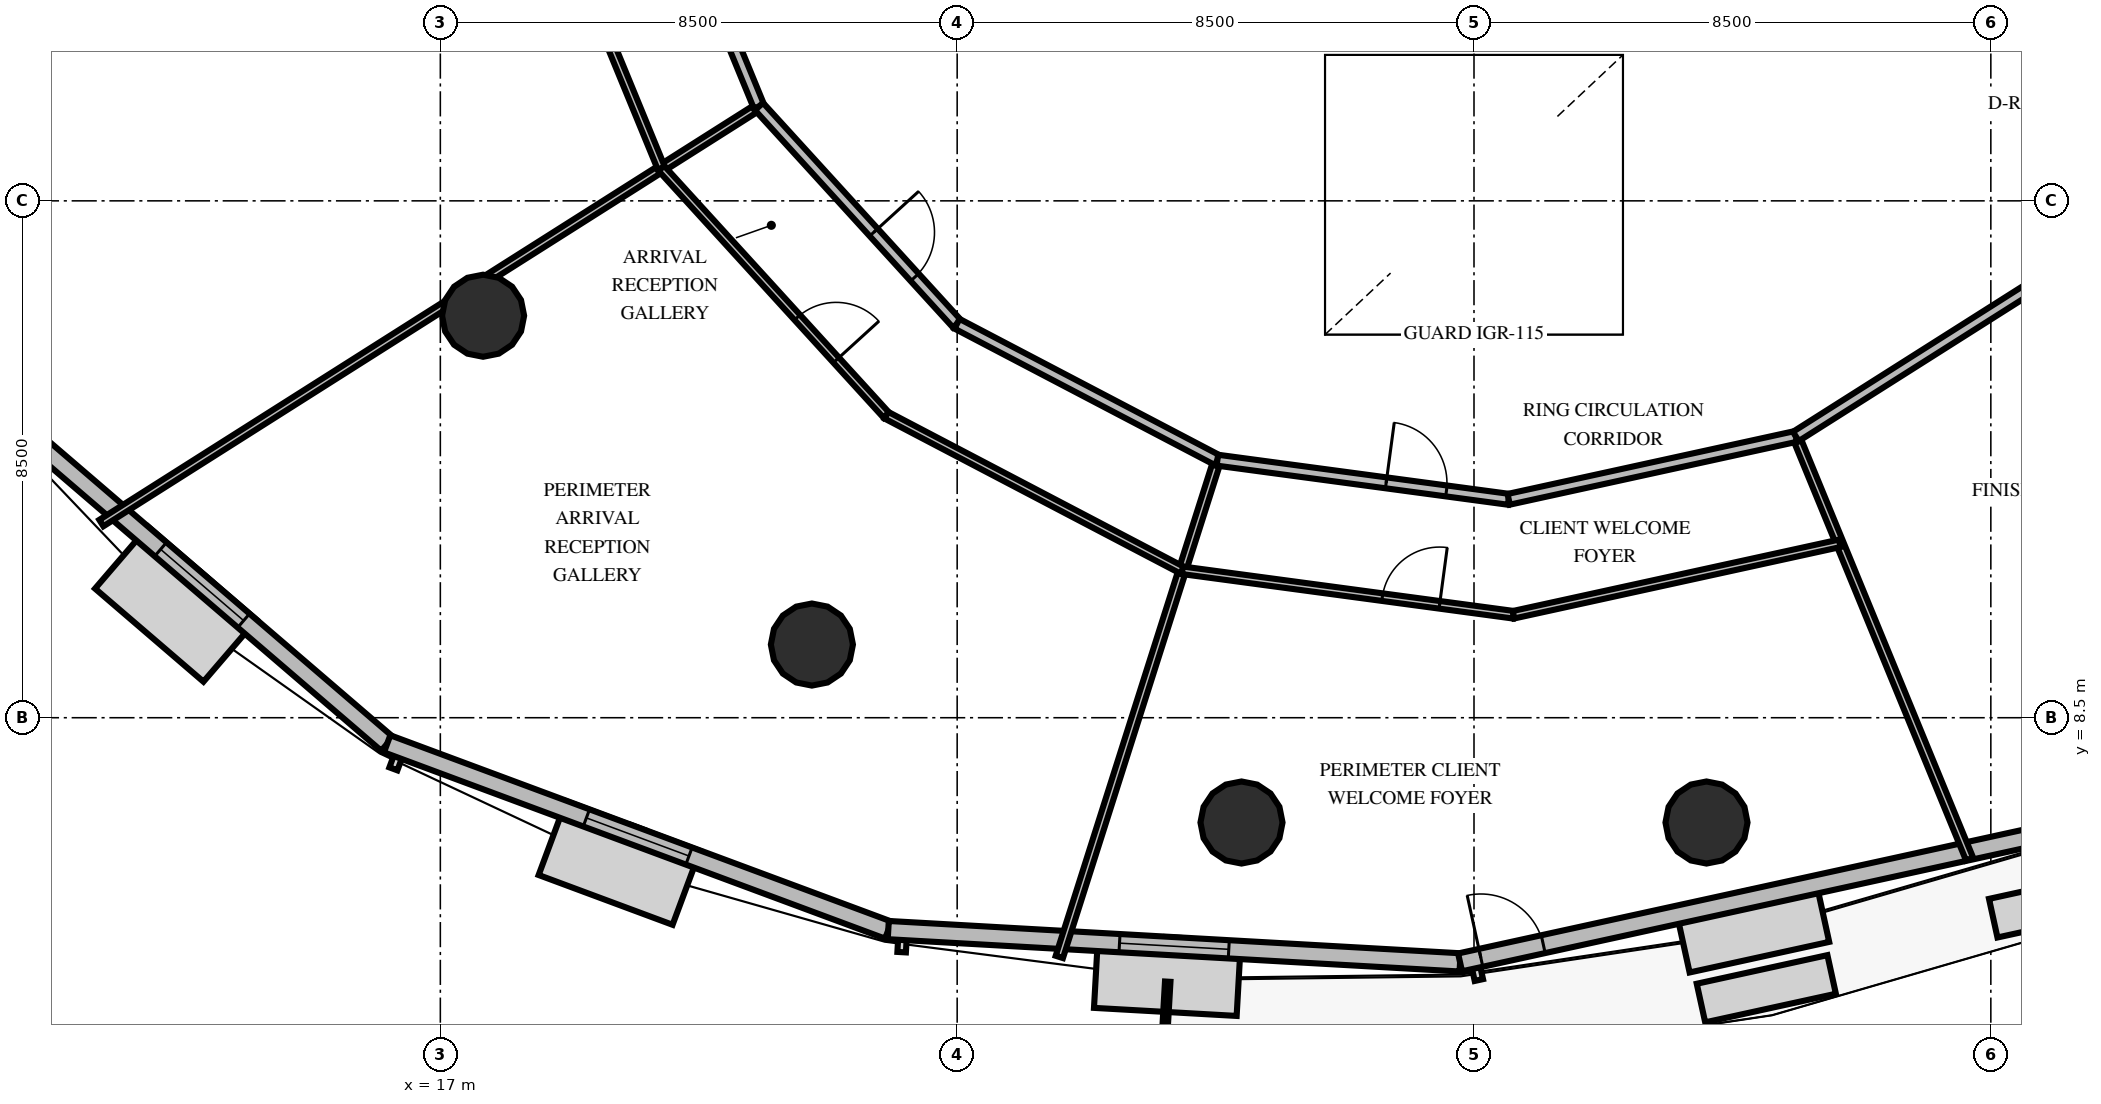
"""IFC4 building model, lengths in metres.
Left out: names, types, materials, properties, quantities, classifications, styles, units other than length and angle.
Written with IfcOpenShell. Run it as: python <this file> out.ifc"""

import sys

from ifc_helpers import new_model, si_unit, direction, frame, frame_2d, origin, origin_2d, place, context, subcontext, project, spatial, rectangle, circle, extrude, element, fill, save


model = new_model("IFC4")
c1 = context("Model", 3, precision=1e-05, world=origin(), true_north=direction((0.0, 1.0)))
c2 = subcontext(c1, "Body", "Model", "MODEL_VIEW")
j1 = project(units=[si_unit("LENGTHUNIT", "METRE"), si_unit("PLANEANGLEUNIT", "RADIAN")], contexts=[c1])
p1 = place(None, origin())
s1 = spatial("IfcSite", under=j1, at=p1, CompositionType="ELEMENT")
p2 = place(p1, origin())
s2 = spatial("IfcBuilding", under=s1, at=p2, CompositionType="ELEMENT")
p3 = place(p2, frame((0.0, 0.0, 84.6)))
s3 = spatial("IfcBuildingStorey", under=s2, at=p3, CompositionType="ELEMENT", Elevation=84.6)
for number, where, z_axis, x_axis in (
    (1, (17.703, 15.111, 0.0), (0.0, 0.0, 1.0), (1.0, 0.0, 0.0)),
    (2, (23.111, 9.703, 0.0), (0.0, 0.0, 1.0), (1.0, 0.0, 0.0)),
    (3, (30.176, 6.777, 0.0), (0.0, 0.0, 1.0), (1.0, 0.0, 0.0)),
    (4, (37.824, 6.777, 0.0), (0.0, 0.0, 1.0), (1.0, 0.0, 0.0)),
):
    element("IfcColumn", number, at=place(p3, frame(where, z_axis=z_axis, x_axis=x_axis)), inside=s3, PredefinedType="COLUMN", context=c2, shape_type="SweptSolid", body=[
        extrude(circle(Radius=0.675, at=origin_2d()), origin(), (0.0, 0.0, 1.0), 4.2),
    ])
p4 = place(p3, frame((10.039, 13.296, 0.0), z_axis=(0.0, 0.0, 1.0), x_axis=(0.758684823953, -0.651457855815, 0.0)))
e5 = element("IfcWall", 5, at=p4, inside=s3, PredefinedType="SOLIDWALL", context=c2, shape_type="SweptSolid", body=[
    extrude(rectangle(XDim=8.021, YDim=0.3, at=frame_2d((4.011, 0.0))), origin(), (0.0, 0.0, 1.0), 2.96),
])
p5 = place(p4, frame((3.111, 0.0, 0.8)))
e6 = element("IfcOpeningElement", 6, at=p5, cuts=e5, PredefinedType="OPENING", context=c2, shape_type="SweptSolid", body=[
    extrude(rectangle(XDim=1.8, YDim=1.95, at=frame_2d((0.9, 0.975))), frame((0.0, 0.16, 0.0), z_axis=(0.0, -1.0, 0.0), x_axis=(1.0, 0.0, 0.0)), (0.0, 0.0, 1.0), 0.32),
])
p6 = place(p3, frame((16.125, 8.071, 0.0), z_axis=(0.0, 0.0, 1.0), x_axis=(0.937362334375, -0.348355930184, 0.0)))
e7 = element("IfcWall", 7, at=p6, inside=s3, PredefinedType="SOLIDWALL", context=c2, shape_type="SweptSolid", body=[
    extrude(rectangle(XDim=8.793, YDim=0.3, at=frame_2d((4.396, 0.0))), origin(), (0.0, 0.0, 1.0), 2.96),
])
p7 = place(p6, frame((3.496, 0.0, 0.8)))
e8 = element("IfcOpeningElement", 8, at=p7, cuts=e7, PredefinedType="OPENING", context=c2, shape_type="SweptSolid", body=[
    extrude(rectangle(XDim=1.8, YDim=1.95, at=frame_2d((0.9, 0.975))), frame((0.0, 0.16, 0.0), z_axis=(0.0, -1.0, 0.0), x_axis=(1.0, 0.0, 0.0)), (0.0, 0.0, 1.0), 0.32),
])
p8 = place(p3, frame((24.367, 5.008, 0.0), z_axis=(0.0, 0.0, 1.0), x_axis=(0.998409535383, -0.056377297353, 0.0)))
e9 = element("IfcWall", 9, at=p8, inside=s3, PredefinedType="SOLIDWALL", context=c2, shape_type="SweptSolid", body=[
    extrude(rectangle(XDim=9.419, YDim=0.3, at=frame_2d((4.709, 0.0))), origin(), (0.0, 0.0, 1.0), 2.96),
])
p9 = place(p8, frame((3.809, 0.0, 0.8)))
e10 = element("IfcOpeningElement", 10, at=p9, cuts=e9, PredefinedType="OPENING", context=c2, shape_type="SweptSolid", body=[
    extrude(rectangle(XDim=1.8, YDim=1.95, at=frame_2d((0.9, 0.975))), frame((0.0, 0.16, 0.0), z_axis=(0.0, -1.0, 0.0), x_axis=(1.0, 0.0, 0.0)), (0.0, 0.0, 1.0), 0.32),
])
p10 = place(p3, frame((33.771, 4.477, 0.0), z_axis=(0.0, 0.0, 1.0), x_axis=(0.97686057385, 0.213877112516, 0.0)))
e11 = element("IfcWall", 11, at=p10, inside=s3, PredefinedType="SOLIDWALL", context=c2, shape_type="SweptSolid", body=[
    extrude(rectangle(XDim=9.655, YDim=0.3, at=frame_2d((4.827, 0.0))), origin(), (0.0, 0.0, 1.0), 2.96),
])
p11 = place(p10, frame((0.35, 0.0, 0.0)))
e12 = element("IfcOpeningElement", 12, at=p11, cuts=e11, PredefinedType="OPENING", context=c2, shape_type="SweptSolid", body=[
    extrude(rectangle(XDim=1.05, YDim=2.15, at=frame_2d((0.525, 1.075))), frame((0.0, 0.16, 0.0), z_axis=(0.0, -1.0, 0.0), x_axis=(1.0, 0.0, 0.0)), (0.0, 0.0, 1.0), 0.32),
])
p12 = place(p3, frame((22.24, 18.552, 0.0), z_axis=(0.0, 0.0, 1.0), x_axis=(-0.844793501384, -0.535092459318, 0.0)))
e13 = element("IfcWall", 13, at=p12, inside=s3, PredefinedType="PARTITIONING", context=c2, shape_type="SweptSolid", body=[
    extrude(rectangle(XDim=12.802, YDim=0.125, at=frame_2d((6.401, 0.0))), origin(), (0.0, 0.0, 1.0), 2.96),
])
p13 = place(p3, frame((20.402, 23.023, 0.0), z_axis=(0.0, 0.0, 1.0), x_axis=(0.380272236521, -0.924874600219, 0.0)))
e14 = element("IfcWall", 14, at=p13, inside=s3, PredefinedType="PARTITIONING", context=c2, shape_type="SweptSolid", body=[
    extrude(rectangle(XDim=4.834, YDim=0.18, at=frame_2d((2.417, 0.0))), origin(), (0.0, 0.0, 1.0), 2.96),
])
p14 = place(p13, frame((1.917, 0.0, 0.0)))
e15 = element("IfcOpeningElement", 15, at=p14, cuts=e14, PredefinedType="OPENING", context=c2, shape_type="SweptSolid", body=[
    extrude(rectangle(XDim=1.0, YDim=2.15, at=frame_2d((0.5, 1.075))), frame((0.0, 0.1, 0.0), z_axis=(0.0, -1.0, 0.0), x_axis=(1.0, 0.0, 0.0)), (0.0, 0.0, 1.0), 0.2),
])
p15 = place(p3, frame((18.546, 22.616, 0.0), z_axis=(0.0, 0.0, 1.0), x_axis=(0.380237945348, -0.924888698665, 0.0)))
e16 = element("IfcWall", 16, at=p15, inside=s3, PredefinedType="PARTITIONING", context=c2, shape_type="SweptSolid", body=[
    extrude(rectangle(XDim=5.494, YDim=0.125, at=frame_2d((2.747, 0.0))), origin(), (0.0, 0.0, 1.0), 2.96),
])
p16 = place(p15, frame((2.272, 0.0, 0.0)))
e17 = element("IfcOpeningElement", 17, at=p16, cuts=e16, PredefinedType="OPENING", context=c2, shape_type="SweptSolid", body=[
    extrude(rectangle(XDim=0.95, YDim=2.15, at=frame_2d((0.475, 1.075))), frame((0.0, 0.073, 0.0), z_axis=(0.0, -1.0, 0.0), x_axis=(1.0, 0.0, 0.0)), (0.0, 0.0, 1.0), 0.145),
])
p17 = place(p3, frame((29.779, 12.735, 0.0), z_axis=(0.0, 0.0, 1.0), x_axis=(-0.303186024905, -0.952931390134, 0.0)))
e18 = element("IfcWall", 18, at=p17, inside=s3, PredefinedType="PARTITIONING", context=c2, shape_type="SweptSolid", body=[
    extrude(rectangle(XDim=8.573, YDim=0.125, at=frame_2d((4.286, 0.0))), origin(), (0.0, 0.0, 1.0), 2.96),
])
p18 = place(p3, frame((22.24, 18.552, 0.0), z_axis=(0.0, 0.0, 1.0), x_axis=(0.673677614221, -0.739025352811, 0.0)))
e19 = element("IfcWall", 19, at=p18, inside=s3, PredefinedType="PARTITIONING", context=c2, shape_type="SweptSolid", body=[
    extrude(rectangle(XDim=4.834, YDim=0.18, at=frame_2d((2.417, 0.0))), origin(), (0.0, 0.0, 1.0), 2.96),
])
p19 = place(p18, frame((2.801, 0.0, 0.0)))
e20 = element("IfcOpeningElement", 20, at=p19, cuts=e19, PredefinedType="OPENING", context=c2, shape_type="SweptSolid", body=[
    extrude(rectangle(XDim=1.0, YDim=2.15, at=frame_2d((0.5, 1.075))), frame((0.0, 0.1, 0.0), z_axis=(0.0, -1.0, 0.0), x_axis=(1.0, 0.0, 0.0)), (0.0, 0.0, 1.0), 0.2),
])
p20 = place(p3, frame((25.497, 14.979, 0.0), z_axis=(0.0, 0.0, 1.0), x_axis=(0.885791991461, -0.464082479591, 0.0)))
e21 = element("IfcWall", 21, at=p20, inside=s3, PredefinedType="PARTITIONING", context=c2, shape_type="SweptSolid", body=[
    extrude(rectangle(XDim=4.834, YDim=0.18, at=frame_2d((2.417, 0.0))), origin(), (0.0, 0.0, 1.0), 2.96),
])
p21 = place(p3, frame((20.635, 17.535, 0.0), z_axis=(0.0, 0.0, 1.0), x_axis=(0.673669644178, -0.739032618031, 0.0)))
e22 = element("IfcWall", 22, at=p21, inside=s3, PredefinedType="PARTITIONING", context=c2, shape_type="SweptSolid", body=[
    extrude(rectangle(XDim=5.494, YDim=0.125, at=frame_2d((2.747, 0.0))), origin(), (0.0, 0.0, 1.0), 2.96),
])
p22 = place(p21, frame((3.318, 0.0, 0.0)))
e23 = element("IfcOpeningElement", 23, at=p22, cuts=e22, PredefinedType="OPENING", context=c2, shape_type="SweptSolid", body=[
    extrude(rectangle(XDim=0.95, YDim=2.15, at=frame_2d((0.475, 1.075))), frame((0.0, 0.073, 0.0), z_axis=(0.0, -1.0, 0.0), x_axis=(1.0, 0.0, 0.0)), (0.0, 0.0, 1.0), 0.145),
])
p23 = place(p3, frame((24.337, 13.474, 0.0), z_axis=(0.0, 0.0, 1.0), x_axis=(0.885806310858, -0.464055147201, 0.0)))
e24 = element("IfcWall", 24, at=p23, inside=s3, PredefinedType="PARTITIONING", context=c2, shape_type="SweptSolid", body=[
    extrude(rectangle(XDim=5.494, YDim=0.125, at=frame_2d((2.747, 0.0))), origin(), (0.0, 0.0, 1.0), 2.96),
])
p24 = place(p3, frame((39.293, 13.126, 0.0), z_axis=(0.0, 0.0, 1.0), x_axis=(0.380252950753, -0.924882529538, 0.0)))
e25 = element("IfcWall", 25, at=p24, inside=s3, PredefinedType="PARTITIONING", context=c2, shape_type="SweptSolid", body=[
    extrude(rectangle(XDim=7.514, YDim=0.125, at=frame_2d((3.757, 0.0))), origin(), (0.0, 0.0, 1.0), 2.96),
])
p25 = place(p3, frame((29.779, 12.735, 0.0), z_axis=(0.0, 0.0, 1.0), x_axis=(0.991100422672, -0.133116310719, 0.0)))
e26 = element("IfcWall", 26, at=p25, inside=s3, PredefinedType="PARTITIONING", context=c2, shape_type="SweptSolid", body=[
    extrude(rectangle(XDim=4.834, YDim=0.18, at=frame_2d((2.417, 0.0))), origin(), (0.0, 0.0, 1.0), 2.96),
])
p26 = place(p25, frame((2.801, 0.0, 0.0)))
e27 = element("IfcOpeningElement", 27, at=p26, cuts=e26, PredefinedType="OPENING", context=c2, shape_type="SweptSolid", body=[
    extrude(rectangle(XDim=1.0, YDim=2.15, at=frame_2d((0.5, 1.075))), frame((0.0, 0.1, 0.0), z_axis=(0.0, -1.0, 0.0), x_axis=(1.0, 0.0, 0.0)), (0.0, 0.0, 1.0), 0.2),
])
p27 = place(p3, frame((34.571, 12.092, 0.0), z_axis=(0.0, 0.0, 1.0), x_axis=(0.976860794811, 0.213876103295, 0.0)))
e28 = element("IfcWall", 28, at=p27, inside=s3, PredefinedType="PARTITIONING", context=c2, shape_type="SweptSolid", body=[
    extrude(rectangle(XDim=4.834, YDim=0.18, at=frame_2d((2.417, 0.0))), origin(), (0.0, 0.0, 1.0), 2.96),
])
p28 = place(p3, frame((29.203, 10.925, 0.0), z_axis=(0.0, 0.0, 1.0), x_axis=(0.991098584907, -0.133129992844, 0.0)))
e29 = element("IfcWall", 29, at=p28, inside=s3, PredefinedType="PARTITIONING", context=c2, shape_type="SweptSolid", body=[
    extrude(rectangle(XDim=5.494, YDim=0.125, at=frame_2d((2.747, 0.0))), origin(), (0.0, 0.0, 1.0), 2.96),
])
p29 = place(p28, frame((3.318, 0.0, 0.0)))
e30 = element("IfcOpeningElement", 30, at=p29, cuts=e29, PredefinedType="OPENING", context=c2, shape_type="SweptSolid", body=[
    extrude(rectangle(XDim=0.95, YDim=2.15, at=frame_2d((0.475, 1.075))), frame((0.0, 0.073, 0.0), z_axis=(0.0, -1.0, 0.0), x_axis=(1.0, 0.0, 0.0)), (0.0, 0.0, 1.0), 0.145),
])
p30 = place(p3, frame((34.649, 10.193, 0.0), z_axis=(0.0, 0.0, 1.0), x_axis=(0.976862897435, 0.213866499516, 0.0)))
e31 = element("IfcWall", 31, at=p30, inside=s3, PredefinedType="PARTITIONING", context=c2, shape_type="SweptSolid", body=[
    extrude(rectangle(XDim=5.494, YDim=0.125, at=frame_2d((2.747, 0.0))), origin(), (0.0, 0.0, 1.0), 2.96),
])
p31 = place(p3, frame((39.293, 13.126, 0.0), z_axis=(0.0, 0.0, 1.0), x_axis=(0.844805378334, 0.535073707762, 0.0)))
e32 = element("IfcWall", 32, at=p31, inside=s3, PredefinedType="PARTITIONING", context=c2, shape_type="SweptSolid", body=[
    extrude(rectangle(XDim=4.834, YDim=0.18, at=frame_2d((2.417, 0.0))), origin(), (0.0, 0.0, 1.0), 2.96),
])
p32 = place(p5, origin())
e33 = element("IfcWindow", 33, at=p32, inside=s3, PartitioningType="SINGLE_PANEL", PredefinedType="WINDOW", context=c2, shape_type="SweptSolid", body=[
    extrude(rectangle(XDim=1.8, YDim=1.95, at=frame_2d((0.9, 0.975))), frame((0.0, 0.03, 0.0), z_axis=(0.0, -1.0, 0.0), x_axis=(1.0, 0.0, 0.0)), (0.0, 0.0, 1.0), 0.06),
])
fill(e6, e33)
p33 = place(p7, origin())
e34 = element("IfcWindow", 34, at=p33, inside=s3, PartitioningType="SINGLE_PANEL", PredefinedType="WINDOW", context=c2, shape_type="SweptSolid", body=[
    extrude(rectangle(XDim=1.8, YDim=1.95, at=frame_2d((0.9, 0.975))), frame((0.0, 0.03, 0.0), z_axis=(0.0, -1.0, 0.0), x_axis=(1.0, 0.0, 0.0)), (0.0, 0.0, 1.0), 0.06),
])
fill(e8, e34)
p34 = place(p9, origin())
e35 = element("IfcWindow", 35, at=p34, inside=s3, PartitioningType="SINGLE_PANEL", PredefinedType="WINDOW", context=c2, shape_type="SweptSolid", body=[
    extrude(rectangle(XDim=1.8, YDim=1.95, at=frame_2d((0.9, 0.975))), frame((0.0, 0.03, 0.0), z_axis=(0.0, -1.0, 0.0), x_axis=(1.0, 0.0, 0.0)), (0.0, 0.0, 1.0), 0.06),
])
fill(e10, e35)
p35 = place(p11, origin())
e36 = element("IfcDoor", 36, at=p35, inside=s3, OperationType="SINGLE_SWING_LEFT", PredefinedType="DOOR", context=c2, shape_type="SweptSolid", body=[
    extrude(rectangle(XDim=1.05, YDim=2.15, at=frame_2d((0.525, 1.075))), frame((0.0, 0.025, 0.0), z_axis=(0.0, -1.0, 0.0), x_axis=(1.0, 0.0, 0.0)), (0.0, 0.0, 1.0), 0.05),
])
fill(e12, e36)
p36 = place(p19, origin())
e37 = element("IfcDoor", 37, at=p36, inside=s3, OperationType="SINGLE_SWING_LEFT", PredefinedType="DOOR", context=c2, shape_type="SweptSolid", body=[
    extrude(rectangle(XDim=1.0, YDim=2.15, at=frame_2d((0.5, 1.075))), frame((0.0, 0.025, 0.0), z_axis=(0.0, -1.0, 0.0), x_axis=(1.0, 0.0, 0.0)), (0.0, 0.0, 1.0), 0.05),
])
fill(e20, e37)
p37 = place(p22, origin())
e38 = element("IfcDoor", 38, at=p37, inside=s3, OperationType="SINGLE_SWING_RIGHT", PredefinedType="DOOR", context=c2, shape_type="SweptSolid", body=[
    extrude(rectangle(XDim=0.95, YDim=2.15, at=frame_2d((0.475, 1.075))), frame((0.0, 0.025, 0.0), z_axis=(0.0, -1.0, 0.0), x_axis=(1.0, 0.0, 0.0)), (0.0, 0.0, 1.0), 0.05),
])
fill(e23, e38)
p38 = place(p26, origin())
e39 = element("IfcDoor", 39, at=p38, inside=s3, OperationType="SINGLE_SWING_LEFT", PredefinedType="DOOR", context=c2, shape_type="SweptSolid", body=[
    extrude(rectangle(XDim=1.0, YDim=2.15, at=frame_2d((0.5, 1.075))), frame((0.0, 0.025, 0.0), z_axis=(0.0, -1.0, 0.0), x_axis=(1.0, 0.0, 0.0)), (0.0, 0.0, 1.0), 0.05),
])
fill(e27, e39)
p39 = place(p29, origin())
e40 = element("IfcDoor", 40, at=p39, inside=s3, OperationType="SINGLE_SWING_RIGHT", PredefinedType="DOOR", context=c2, shape_type="SweptSolid", body=[
    extrude(rectangle(XDim=0.95, YDim=2.15, at=frame_2d((0.475, 1.075))), frame((0.0, 0.025, 0.0), z_axis=(0.0, -1.0, 0.0), x_axis=(1.0, 0.0, 0.0)), (0.0, 0.0, 1.0), 0.05),
])
fill(e30, e40)
save(model, sys.argv[1])
